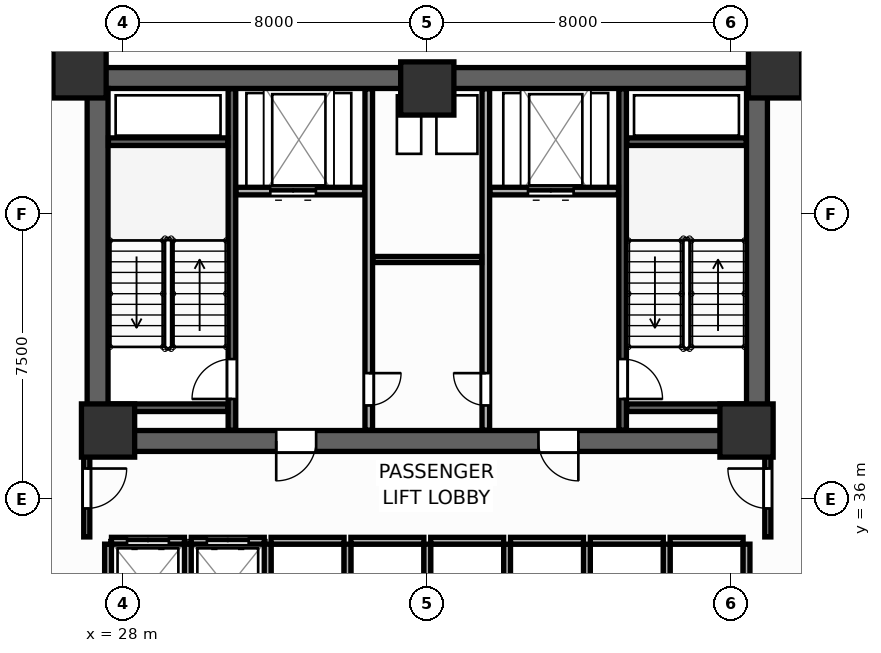
"""IFC4 building model, lengths in metres.
Left out: names, types, materials, properties, quantities, classifications, styles, units other than length and angle.
Written with IfcOpenShell. Run it as: python <this file> out.ifc"""

import sys

from ifc_helpers import new_model, si_unit, direction, frame, frame_2d, origin, origin_2d, place, context, subcontext, project, spatial, rectangle, extrude, source, transform, mapped, element, fill, save


model = new_model("IFC4")
c1 = context("Model", 3, precision=1e-05, world=origin(), true_north=direction((0.0, 1.0)))
c2 = subcontext(c1, "Body", "Model", "MODEL_VIEW")
j1 = project(units=[si_unit("LENGTHUNIT", "METRE"), si_unit("PLANEANGLEUNIT", "RADIAN")], contexts=[c1])
p1 = place(None, origin())
s1 = spatial("IfcSite", under=j1, at=p1, CompositionType="ELEMENT")
p2 = place(p1, origin())
s2 = spatial("IfcBuilding", under=s1, at=p2, CompositionType="ELEMENT")
p3 = place(p2, frame((0.0, 0.0, 71.7)))
s3 = spatial("IfcBuildingStorey", under=s2, at=p3, CompositionType="ELEMENT", Elevation=71.7)
p4 = place(p3, frame((27.05, 47.075, 0.0), z_axis=(0.0, 0.0, 1.0), x_axis=(1.0, 0.0, 0.0)))
e1 = element("IfcWall", 1, at=p4, inside=s3, PredefinedType="SHEAR", context=c2, shape_type="SweptSolid", body=[
    extrude(rectangle(XDim=17.9, YDim=0.55, at=frame_2d((8.95, 0.0))), origin(), (0.0, 0.0, 1.0), 3.9),
])
p5 = place(p3, frame((27.05, 37.525, 0.0), z_axis=(0.0, 0.0, 1.0), x_axis=(1.0, 0.0, 0.0)))
e2 = element("IfcWall", 2, at=p5, inside=s3, PredefinedType="SHEAR", context=c2, shape_type="SweptSolid", body=[
    extrude(rectangle(XDim=17.9, YDim=0.55, at=frame_2d((8.95, 0.0))), origin(), (0.0, 0.0, 1.0), 3.9),
])
p6 = place(p5, frame((4.975, 0.0, 0.0)))
e3 = element("IfcOpeningElement", 3, at=p6, cuts=e2, PredefinedType="OPENING", context=c2, shape_type="SweptSolid", body=[
    extrude(rectangle(XDim=1.05, YDim=2.1, at=frame_2d((0.525, 1.05))), frame((0.0, 0.285, 0.0), z_axis=(0.0, -1.0, 0.0), x_axis=(1.0, 0.0, 0.0)), (0.0, 0.0, 1.0), 0.57),
])
p7 = place(p5, frame((11.875, 0.0, 0.0)))
e4 = element("IfcOpeningElement", 4, at=p7, cuts=e2, PredefinedType="OPENING", context=c2, shape_type="SweptSolid", body=[
    extrude(rectangle(XDim=1.05, YDim=2.1, at=frame_2d((0.525, 1.05))), frame((0.0, 0.285, 0.0), z_axis=(0.0, -1.0, 0.0), x_axis=(1.0, 0.0, 0.0)), (0.0, 0.0, 1.0), 0.57),
])
for number, where, z_axis, x_axis in (
    (5, (27.325, 37.8, 0.0), (0.0, 0.0, 1.0), (0.0, 1.0, 0.0)),
    (6, (44.675, 37.8, 0.0), (0.0, 0.0, 1.0), (0.0, 1.0, 0.0)),
):
    element("IfcWall", number, at=place(p3, frame(where, z_axis=z_axis, x_axis=x_axis)), inside=s3, PredefinedType="SHEAR", context=c2, shape_type="SweptSolid", body=[
        extrude(rectangle(XDim=9.0, YDim=0.55, at=frame_2d((4.5, 0.0))), origin(), (0.0, 0.0, 1.0), 3.9),
    ])
m1 = source(origin(), c2, "Body", "SweptSolid", [
    extrude(rectangle(XDim=1.4, YDim=1.4, at=origin_2d()), origin(), (0.0, 0.0, 1.0), 3.9),
])
for number, where, z_axis, x_axis in (
    (7, (26.85, 47.25, 0.0), (0.0, 0.0, 1.0), (1.0, 0.0, 0.0)),
    (8, (45.15, 47.25, 0.0), (0.0, 0.0, 1.0), (1.0, 0.0, 0.0)),
    (9, (27.6, 37.8, 0.0), (0.0, 0.0, 1.0), (1.0, 0.0, 0.0)),
    (10, (44.4, 37.8, 0.0), (0.0, 0.0, 1.0), (1.0, 0.0, 0.0)),
    (11, (36.0, 46.8, 0.0), (0.0, 0.0, 1.0), (1.0, 0.0, 0.0)),
):
    element("IfcColumn", number, at=place(p3, frame(where, z_axis=z_axis, x_axis=x_axis)), inside=s3, PredefinedType="COLUMN", context=c2, shape_type="MappedRepresentation", body=[
        mapped(m1, transform((0.0, 0.0, 0.0), scale=1.0)),
    ])
p8 = place(p3, frame((30.86, 37.81, 0.0), z_axis=(0.0, 0.0, 1.0), x_axis=(0.0, 1.0, 0.0)))
e12 = element("IfcWall", 12, at=p8, inside=s3, PredefinedType="SHEAR", context=c2, shape_type="SweptSolid", body=[
    extrude(rectangle(XDim=8.98, YDim=0.2, at=frame_2d((4.49, 0.0))), origin(), (0.0, 0.0, 1.0), 3.9),
])
p9 = place(p8, frame((0.82, 0.0, 0.0)))
e13 = element("IfcOpeningElement", 13, at=p9, cuts=e12, PredefinedType="OPENING", context=c2, shape_type="SweptSolid", body=[
    extrude(rectangle(XDim=1.05, YDim=2.1, at=frame_2d((0.525, 1.05))), frame((0.0, 0.11, 0.0), z_axis=(0.0, -1.0, 0.0), x_axis=(1.0, 0.0, 0.0)), (0.0, 0.0, 1.0), 0.22),
])
for number, where, z_axis, x_axis in (
    (14, (27.61, 45.4, 0.0), (0.0, 0.0, 1.0), (1.0, 0.0, 0.0)),
    (15, (27.61, 38.4, 0.0), (0.0, 0.0, 1.0), (1.0, 0.0, 0.0)),
):
    element("IfcWall", number, at=place(p3, frame(where, z_axis=z_axis, x_axis=x_axis)), inside=s3, PredefinedType="SHEAR", context=c2, shape_type="SweptSolid", body=[
        extrude(rectangle(XDim=3.14, YDim=0.2, at=frame_2d((1.57, 0.0))), origin(), (0.0, 0.0, 1.0), 3.9),
    ])
p10 = place(p3, frame((41.14, 37.81, 0.0), z_axis=(0.0, 0.0, 1.0), x_axis=(0.0, 1.0, 0.0)))
e16 = element("IfcWall", 16, at=p10, inside=s3, PredefinedType="SHEAR", context=c2, shape_type="SweptSolid", body=[
    extrude(rectangle(XDim=8.98, YDim=0.2, at=frame_2d((4.49, 0.0))), origin(), (0.0, 0.0, 1.0), 3.9),
])
p11 = place(p10, frame((0.82, 0.0, 0.0)))
e17 = element("IfcOpeningElement", 17, at=p11, cuts=e16, PredefinedType="OPENING", context=c2, shape_type="SweptSolid", body=[
    extrude(rectangle(XDim=1.05, YDim=2.1, at=frame_2d((0.525, 1.05))), frame((0.0, 0.11, 0.0), z_axis=(0.0, -1.0, 0.0), x_axis=(1.0, 0.0, 0.0)), (0.0, 0.0, 1.0), 0.22),
])
for number, where, z_axis, x_axis in (
    (18, (41.25, 45.4, 0.0), (0.0, 0.0, 1.0), (1.0, 0.0, 0.0)),
    (19, (41.25, 38.4, 0.0), (0.0, 0.0, 1.0), (1.0, 0.0, 0.0)),
):
    element("IfcWall", number, at=place(p3, frame(where, z_axis=z_axis, x_axis=x_axis)), inside=s3, PredefinedType="SHEAR", context=c2, shape_type="SweptSolid", body=[
        extrude(rectangle(XDim=3.14, YDim=0.2, at=frame_2d((1.57, 0.0))), origin(), (0.0, 0.0, 1.0), 3.9),
    ])
p12 = place(p3, frame((30.97, 44.1, 0.0), z_axis=(0.0, 0.0, 1.0), x_axis=(1.0, 0.0, 0.0)))
e20 = element("IfcWall", 20, at=p12, inside=s3, PredefinedType="PARTITIONING", context=c2, shape_type="SweptSolid", body=[
    extrude(rectangle(XDim=3.38, YDim=0.2, at=frame_2d((1.69, 0.0))), origin(), (0.0, 0.0, 1.0), 3.68),
])
p13 = place(p12, frame((0.9, 0.0, 0.0)))
e21 = element("IfcOpeningElement", 21, at=p13, cuts=e20, PredefinedType="OPENING", context=c2, shape_type="SweptSolid", body=[
    extrude(rectangle(XDim=1.2, YDim=2.1, at=frame_2d((0.6, 1.05))), frame((0.0, 0.11, 0.0), z_axis=(0.0, -1.0, 0.0), x_axis=(1.0, 0.0, 0.0)), (0.0, 0.0, 1.0), 0.22),
])
p14 = place(p3, frame((37.65, 44.1, 0.0), z_axis=(0.0, 0.0, 1.0), x_axis=(1.0, 0.0, 0.0)))
e22 = element("IfcWall", 22, at=p14, inside=s3, PredefinedType="PARTITIONING", context=c2, shape_type="SweptSolid", body=[
    extrude(rectangle(XDim=3.38, YDim=0.2, at=frame_2d((1.69, 0.0))), origin(), (0.0, 0.0, 1.0), 3.68),
])
p15 = place(p14, frame((1.0, 0.0, 0.0)))
e23 = element("IfcOpeningElement", 23, at=p15, cuts=e22, PredefinedType="OPENING", context=c2, shape_type="SweptSolid", body=[
    extrude(rectangle(XDim=1.2, YDim=2.1, at=frame_2d((0.6, 1.05))), frame((0.0, 0.11, 0.0), z_axis=(0.0, -1.0, 0.0), x_axis=(1.0, 0.0, 0.0)), (0.0, 0.0, 1.0), 0.22),
])
p16 = place(p3, frame((34.46, 37.81, 0.0), z_axis=(0.0, 0.0, 1.0), x_axis=(0.0, 1.0, 0.0)))
e24 = element("IfcWall", 24, at=p16, inside=s3, PredefinedType="PARTITIONING", context=c2, shape_type="SweptSolid", body=[
    extrude(rectangle(XDim=8.98, YDim=0.2, at=frame_2d((4.49, 0.0))), origin(), (0.0, 0.0, 1.0), 3.68),
])
p17 = place(p16, frame((0.65, 0.0, 0.0)))
e25 = element("IfcOpeningElement", 25, at=p17, cuts=e24, PredefinedType="OPENING", context=c2, shape_type="SweptSolid", body=[
    extrude(rectangle(XDim=0.85, YDim=2.05, at=frame_2d((0.425, 1.025))), frame((0.0, 0.11, 0.0), z_axis=(0.0, -1.0, 0.0), x_axis=(1.0, 0.0, 0.0)), (0.0, 0.0, 1.0), 0.22),
])
p18 = place(p3, frame((37.54, 37.81, 0.0), z_axis=(0.0, 0.0, 1.0), x_axis=(0.0, 1.0, 0.0)))
e26 = element("IfcWall", 26, at=p18, inside=s3, PredefinedType="PARTITIONING", context=c2, shape_type="SweptSolid", body=[
    extrude(rectangle(XDim=8.98, YDim=0.2, at=frame_2d((4.49, 0.0))), origin(), (0.0, 0.0, 1.0), 3.68),
])
p19 = place(p18, frame((0.65, 0.0, 0.0)))
e27 = element("IfcOpeningElement", 27, at=p19, cuts=e26, PredefinedType="OPENING", context=c2, shape_type="SweptSolid", body=[
    extrude(rectangle(XDim=0.85, YDim=2.05, at=frame_2d((0.425, 1.025))), frame((0.0, 0.11, 0.0), z_axis=(0.0, -1.0, 0.0), x_axis=(1.0, 0.0, 0.0)), (0.0, 0.0, 1.0), 0.22),
])
p20 = place(p3, frame((34.57, 42.3, 0.0), z_axis=(0.0, 0.0, 1.0), x_axis=(1.0, 0.0, 0.0)))
e28 = element("IfcWall", 28, at=p20, inside=s3, PredefinedType="PARTITIONING", context=c2, shape_type="SweptSolid", body=[
    extrude(rectangle(XDim=2.86, YDim=0.16, at=frame_2d((1.43, 0.0))), origin(), (0.0, 0.0, 1.0), 3.68),
])
p21 = place(p3, frame((27.69, 34.9, 0.0), z_axis=(0.0, 0.0, 1.0), x_axis=(1.0, 0.0, 0.0)))
e29 = element("IfcWall", 29, at=p21, inside=s3, PredefinedType="PARTITIONING", context=c2, shape_type="SweptSolid", body=[
    extrude(rectangle(XDim=1.92, YDim=0.18, at=frame_2d((0.96, 0.0))), origin(), (0.0, 0.0, 1.0), 3.68),
])
p22 = place(p21, frame((0.41, 0.0, 0.0)))
e30 = element("IfcOpeningElement", 30, at=p22, cuts=e29, PredefinedType="OPENING", context=c2, shape_type="SweptSolid", body=[
    extrude(rectangle(XDim=1.1, YDim=2.1, at=frame_2d((0.55, 1.05))), frame((0.0, 0.1, 0.0), z_axis=(0.0, -1.0, 0.0), x_axis=(1.0, 0.0, 0.0)), (0.0, 0.0, 1.0), 0.2),
])
p23 = place(p3, frame((27.6, 32.49, 0.0), z_axis=(0.0, 0.0, 1.0), x_axis=(0.0, 1.0, 0.0)))
e31 = element("IfcWall", 31, at=p23, inside=s3, PredefinedType="PARTITIONING", context=c2, shape_type="SweptSolid", body=[
    extrude(rectangle(XDim=2.32, YDim=0.18, at=frame_2d((1.16, 0.0))), origin(), (0.0, 0.0, 1.0), 3.68),
])
p24 = place(p3, frame((29.79, 34.9, 0.0), z_axis=(0.0, 0.0, 1.0), x_axis=(1.0, 0.0, 0.0)))
e32 = element("IfcWall", 32, at=p24, inside=s3, PredefinedType="PARTITIONING", context=c2, shape_type="SweptSolid", body=[
    extrude(rectangle(XDim=1.92, YDim=0.18, at=frame_2d((0.96, 0.0))), origin(), (0.0, 0.0, 1.0), 3.68),
])
p25 = place(p24, frame((0.41, 0.0, 0.0)))
e33 = element("IfcOpeningElement", 33, at=p25, cuts=e32, PredefinedType="OPENING", context=c2, shape_type="SweptSolid", body=[
    extrude(rectangle(XDim=1.1, YDim=2.1, at=frame_2d((0.55, 1.05))), frame((0.0, 0.1, 0.0), z_axis=(0.0, -1.0, 0.0), x_axis=(1.0, 0.0, 0.0)), (0.0, 0.0, 1.0), 0.2),
])
p26 = place(p3, frame((29.7, 32.49, 0.0), z_axis=(0.0, 0.0, 1.0), x_axis=(0.0, 1.0, 0.0)))
e34 = element("IfcWall", 34, at=p26, inside=s3, PredefinedType="PARTITIONING", context=c2, shape_type="SweptSolid", body=[
    extrude(rectangle(XDim=2.32, YDim=0.18, at=frame_2d((1.16, 0.0))), origin(), (0.0, 0.0, 1.0), 3.68),
])
p27 = place(p3, frame((31.89, 34.9, 0.0), z_axis=(0.0, 0.0, 1.0), x_axis=(1.0, 0.0, 0.0)))
e35 = element("IfcWall", 35, at=p27, inside=s3, PredefinedType="PARTITIONING", context=c2, shape_type="SweptSolid", body=[
    extrude(rectangle(XDim=1.92, YDim=0.18, at=frame_2d((0.96, 0.0))), origin(), (0.0, 0.0, 1.0), 3.68),
])
p28 = place(p3, frame((31.8, 32.49, 0.0), z_axis=(0.0, 0.0, 1.0), x_axis=(0.0, 1.0, 0.0)))
e36 = element("IfcWall", 36, at=p28, inside=s3, PredefinedType="PARTITIONING", context=c2, shape_type="SweptSolid", body=[
    extrude(rectangle(XDim=2.32, YDim=0.18, at=frame_2d((1.16, 0.0))), origin(), (0.0, 0.0, 1.0), 3.68),
])
p29 = place(p3, frame((33.99, 34.9, 0.0), z_axis=(0.0, 0.0, 1.0), x_axis=(1.0, 0.0, 0.0)))
e37 = element("IfcWall", 37, at=p29, inside=s3, PredefinedType="PARTITIONING", context=c2, shape_type="SweptSolid", body=[
    extrude(rectangle(XDim=1.92, YDim=0.18, at=frame_2d((0.96, 0.0))), origin(), (0.0, 0.0, 1.0), 3.68),
])
p30 = place(p3, frame((33.9, 32.49, 0.0), z_axis=(0.0, 0.0, 1.0), x_axis=(0.0, 1.0, 0.0)))
e38 = element("IfcWall", 38, at=p30, inside=s3, PredefinedType="PARTITIONING", context=c2, shape_type="SweptSolid", body=[
    extrude(rectangle(XDim=2.32, YDim=0.18, at=frame_2d((1.16, 0.0))), origin(), (0.0, 0.0, 1.0), 3.68),
])
p31 = place(p3, frame((36.09, 34.9, 0.0), z_axis=(0.0, 0.0, 1.0), x_axis=(1.0, 0.0, 0.0)))
e39 = element("IfcWall", 39, at=p31, inside=s3, PredefinedType="PARTITIONING", context=c2, shape_type="SweptSolid", body=[
    extrude(rectangle(XDim=1.92, YDim=0.18, at=frame_2d((0.96, 0.0))), origin(), (0.0, 0.0, 1.0), 3.68),
])
p32 = place(p3, frame((36.0, 32.49, 0.0), z_axis=(0.0, 0.0, 1.0), x_axis=(0.0, 1.0, 0.0)))
e40 = element("IfcWall", 40, at=p32, inside=s3, PredefinedType="PARTITIONING", context=c2, shape_type="SweptSolid", body=[
    extrude(rectangle(XDim=2.32, YDim=0.18, at=frame_2d((1.16, 0.0))), origin(), (0.0, 0.0, 1.0), 3.68),
])
p33 = place(p3, frame((38.19, 34.9, 0.0), z_axis=(0.0, 0.0, 1.0), x_axis=(1.0, 0.0, 0.0)))
e41 = element("IfcWall", 41, at=p33, inside=s3, PredefinedType="PARTITIONING", context=c2, shape_type="SweptSolid", body=[
    extrude(rectangle(XDim=1.92, YDim=0.18, at=frame_2d((0.96, 0.0))), origin(), (0.0, 0.0, 1.0), 3.68),
])
p34 = place(p3, frame((38.1, 32.49, 0.0), z_axis=(0.0, 0.0, 1.0), x_axis=(0.0, 1.0, 0.0)))
e42 = element("IfcWall", 42, at=p34, inside=s3, PredefinedType="PARTITIONING", context=c2, shape_type="SweptSolid", body=[
    extrude(rectangle(XDim=2.32, YDim=0.18, at=frame_2d((1.16, 0.0))), origin(), (0.0, 0.0, 1.0), 3.68),
])
p35 = place(p3, frame((40.29, 34.9, 0.0), z_axis=(0.0, 0.0, 1.0), x_axis=(1.0, 0.0, 0.0)))
e43 = element("IfcWall", 43, at=p35, inside=s3, PredefinedType="PARTITIONING", context=c2, shape_type="SweptSolid", body=[
    extrude(rectangle(XDim=1.92, YDim=0.18, at=frame_2d((0.96, 0.0))), origin(), (0.0, 0.0, 1.0), 3.68),
])
p36 = place(p3, frame((40.2, 32.49, 0.0), z_axis=(0.0, 0.0, 1.0), x_axis=(0.0, 1.0, 0.0)))
e44 = element("IfcWall", 44, at=p36, inside=s3, PredefinedType="PARTITIONING", context=c2, shape_type="SweptSolid", body=[
    extrude(rectangle(XDim=2.32, YDim=0.18, at=frame_2d((1.16, 0.0))), origin(), (0.0, 0.0, 1.0), 3.68),
])
p37 = place(p3, frame((42.39, 34.9, 0.0), z_axis=(0.0, 0.0, 1.0), x_axis=(1.0, 0.0, 0.0)))
e45 = element("IfcWall", 45, at=p37, inside=s3, PredefinedType="PARTITIONING", context=c2, shape_type="SweptSolid", body=[
    extrude(rectangle(XDim=1.92, YDim=0.18, at=frame_2d((0.96, 0.0))), origin(), (0.0, 0.0, 1.0), 3.68),
])
for number, where, z_axis, x_axis in (
    (46, (42.3, 32.49, 0.0), (0.0, 0.0, 1.0), (0.0, 1.0, 0.0)),
    (47, (44.4, 32.49, 0.0), (0.0, 0.0, 1.0), (0.0, 1.0, 0.0)),
):
    element("IfcWall", number, at=place(p3, frame(where, z_axis=z_axis, x_axis=x_axis)), inside=s3, PredefinedType="PARTITIONING", context=c2, shape_type="SweptSolid", body=[
        extrude(rectangle(XDim=2.32, YDim=0.18, at=frame_2d((1.16, 0.0))), origin(), (0.0, 0.0, 1.0), 3.68),
    ])
p38 = place(p3, frame((27.04, 35.0, 0.0), z_axis=(0.0, 0.0, 1.0), x_axis=(0.0, 1.0, 0.0)))
e48 = element("IfcWall", 48, at=p38, inside=s3, PredefinedType="PARTITIONING", context=c2, shape_type="SweptSolid", body=[
    extrude(rectangle(XDim=2.65, YDim=0.16, at=frame_2d((1.325, 0.0))), origin(), (0.0, 0.0, 1.0), 3.68),
])
p39 = place(p38, frame((0.75, 0.0, 0.0)))
e49 = element("IfcOpeningElement", 49, at=p39, cuts=e48, PredefinedType="OPENING", context=c2, shape_type="SweptSolid", body=[
    extrude(rectangle(XDim=1.05, YDim=2.1, at=frame_2d((0.525, 1.05))), frame((0.0, 0.09, 0.0), z_axis=(0.0, -1.0, 0.0), x_axis=(1.0, 0.0, 0.0)), (0.0, 0.0, 1.0), 0.18),
])
p40 = place(p3, frame((44.96, 35.0, 0.0), z_axis=(0.0, 0.0, 1.0), x_axis=(0.0, 1.0, 0.0)))
e50 = element("IfcWall", 50, at=p40, inside=s3, PredefinedType="PARTITIONING", context=c2, shape_type="SweptSolid", body=[
    extrude(rectangle(XDim=2.65, YDim=0.16, at=frame_2d((1.325, 0.0))), origin(), (0.0, 0.0, 1.0), 3.68),
])
p41 = place(p40, frame((0.75, 0.0, 0.0)))
e51 = element("IfcOpeningElement", 51, at=p41, cuts=e50, PredefinedType="OPENING", context=c2, shape_type="SweptSolid", body=[
    extrude(rectangle(XDim=1.05, YDim=2.1, at=frame_2d((0.525, 1.05))), frame((0.0, 0.09, 0.0), z_axis=(0.0, -1.0, 0.0), x_axis=(1.0, 0.0, 0.0)), (0.0, 0.0, 1.0), 0.18),
])
p42 = place(p3, frame((44.965, 47.34, 0.0), z_axis=(0.0, 0.0, 1.0), x_axis=(0.0, 1.0, 0.0)))
e52 = element("IfcWall", 52, at=p42, inside=s3, PredefinedType="PARTITIONING", context=c2, shape_type="SweptSolid", body=[
    extrude(rectangle(XDim=9.017, YDim=0.16, at=frame_2d((4.508, 0.0))), origin(), (0.0, 0.0, 1.0), 2.24),
])
p43 = place(p42, frame((3.927, 0.0, 0.0)))
e53 = element("IfcOpeningElement", 53, at=p43, cuts=e52, PredefinedType="OPENING", context=c2, shape_type="SweptSolid", body=[
    extrude(rectangle(XDim=0.95, YDim=2.05, at=frame_2d((0.475, 1.025))), frame((0.0, 0.09, 0.0), z_axis=(0.0, -1.0, 0.0), x_axis=(1.0, 0.0, 0.0)), (0.0, 0.0, 1.0), 0.18),
])
p44 = place(p3, frame((27.035, 47.34, 0.0), z_axis=(0.0, 0.0, 1.0), x_axis=(0.0, 1.0, 0.0)))
e54 = element("IfcWall", 54, at=p44, inside=s3, PredefinedType="PARTITIONING", context=c2, shape_type="SweptSolid", body=[
    extrude(rectangle(XDim=8.094, YDim=0.16, at=frame_2d((4.047, 0.0))), origin(), (0.0, 0.0, 1.0), 3.68),
])
p45 = place(p9, origin())
e55 = element("IfcDoor", 55, at=p45, inside=s3, OperationType="SINGLE_SWING_LEFT", PredefinedType="DOOR", context=c2, shape_type="SweptSolid", body=[
    extrude(rectangle(XDim=1.05, YDim=2.1, at=frame_2d((0.525, 1.05))), frame((0.0, 0.025, 0.0), z_axis=(0.0, -1.0, 0.0), x_axis=(1.0, 0.0, 0.0)), (0.0, 0.0, 1.0), 0.05),
])
fill(e13, e55)
p46 = place(p11, frame((1.05, 0.0, 0.0), z_axis=(0.0, 0.0, 1.0), x_axis=(-1.0, 0.0, 0.0)))
e56 = element("IfcDoor", 56, at=p46, inside=s3, OperationType="SINGLE_SWING_RIGHT", PredefinedType="DOOR", context=c2, shape_type="SweptSolid", body=[
    extrude(rectangle(XDim=1.05, YDim=2.1, at=frame_2d((0.525, 1.05))), frame((0.0, 0.025, 0.0), z_axis=(0.0, -1.0, 0.0), x_axis=(1.0, 0.0, 0.0)), (0.0, 0.0, 1.0), 0.05),
])
fill(e17, e56)
p47 = place(p13, origin())
e57 = element("IfcDoor", 57, at=p47, inside=s3, OperationType="DOUBLE_DOOR_SLIDING", PredefinedType="DOOR", context=c2, shape_type="SweptSolid", body=[
    extrude(rectangle(XDim=1.2, YDim=2.1, at=frame_2d((0.6, 1.05))), frame((0.0, 0.025, 0.0), z_axis=(0.0, -1.0, 0.0), x_axis=(1.0, 0.0, 0.0)), (0.0, 0.0, 1.0), 0.05),
])
fill(e21, e57)
p48 = place(p15, origin())
e58 = element("IfcDoor", 58, at=p48, inside=s3, OperationType="DOUBLE_DOOR_SLIDING", PredefinedType="DOOR", context=c2, shape_type="SweptSolid", body=[
    extrude(rectangle(XDim=1.2, YDim=2.1, at=frame_2d((0.6, 1.05))), frame((0.0, 0.025, 0.0), z_axis=(0.0, -1.0, 0.0), x_axis=(1.0, 0.0, 0.0)), (0.0, 0.0, 1.0), 0.05),
])
fill(e23, e58)
p49 = place(p17, frame((0.85, 0.0, 0.0), z_axis=(0.0, 0.0, 1.0), x_axis=(-1.0, 0.0, 0.0)))
e59 = element("IfcDoor", 59, at=p49, inside=s3, OperationType="SINGLE_SWING_LEFT", PredefinedType="DOOR", context=c2, shape_type="SweptSolid", body=[
    extrude(rectangle(XDim=0.85, YDim=2.05, at=frame_2d((0.425, 1.025))), frame((0.0, 0.025, 0.0), z_axis=(0.0, -1.0, 0.0), x_axis=(1.0, 0.0, 0.0)), (0.0, 0.0, 1.0), 0.05),
])
fill(e25, e59)
p50 = place(p19, origin())
e60 = element("IfcDoor", 60, at=p50, inside=s3, OperationType="SINGLE_SWING_RIGHT", PredefinedType="DOOR", context=c2, shape_type="SweptSolid", body=[
    extrude(rectangle(XDim=0.85, YDim=2.05, at=frame_2d((0.425, 1.025))), frame((0.0, 0.025, 0.0), z_axis=(0.0, -1.0, 0.0), x_axis=(1.0, 0.0, 0.0)), (0.0, 0.0, 1.0), 0.05),
])
fill(e27, e60)
p51 = place(p22, origin())
e61 = element("IfcDoor", 61, at=p51, inside=s3, OperationType="DOUBLE_DOOR_SLIDING", PredefinedType="DOOR", context=c2, shape_type="SweptSolid", body=[
    extrude(rectangle(XDim=1.1, YDim=2.1, at=frame_2d((0.55, 1.05))), frame((0.0, 0.025, 0.0), z_axis=(0.0, -1.0, 0.0), x_axis=(1.0, 0.0, 0.0)), (0.0, 0.0, 1.0), 0.05),
])
fill(e30, e61)
p52 = place(p25, origin())
e62 = element("IfcDoor", 62, at=p52, inside=s3, OperationType="DOUBLE_DOOR_SLIDING", PredefinedType="DOOR", context=c2, shape_type="SweptSolid", body=[
    extrude(rectangle(XDim=1.1, YDim=2.1, at=frame_2d((0.55, 1.05))), frame((0.0, 0.025, 0.0), z_axis=(0.0, -1.0, 0.0), x_axis=(1.0, 0.0, 0.0)), (0.0, 0.0, 1.0), 0.05),
])
fill(e33, e62)
p53 = place(p39, frame((1.05, 0.0, 0.0), z_axis=(0.0, 0.0, 1.0), x_axis=(-1.0, 0.0, 0.0)))
e63 = element("IfcDoor", 63, at=p53, inside=s3, OperationType="SINGLE_SWING_LEFT", PredefinedType="DOOR", context=c2, shape_type="SweptSolid", body=[
    extrude(rectangle(XDim=1.05, YDim=2.1, at=frame_2d((0.525, 1.05))), frame((0.0, 0.025, 0.0), z_axis=(0.0, -1.0, 0.0), x_axis=(1.0, 0.0, 0.0)), (0.0, 0.0, 1.0), 0.05),
])
fill(e49, e63)
p54 = place(p41, origin())
e64 = element("IfcDoor", 64, at=p54, inside=s3, OperationType="SINGLE_SWING_RIGHT", PredefinedType="DOOR", context=c2, shape_type="SweptSolid", body=[
    extrude(rectangle(XDim=1.05, YDim=2.1, at=frame_2d((0.525, 1.05))), frame((0.0, 0.025, 0.0), z_axis=(0.0, -1.0, 0.0), x_axis=(1.0, 0.0, 0.0)), (0.0, 0.0, 1.0), 0.05),
])
fill(e51, e64)
p55 = place(p6, frame((1.05, 0.0, 0.0), z_axis=(0.0, 0.0, 1.0), x_axis=(-1.0, 0.0, 0.0)))
e65 = element("IfcDoor", 65, at=p55, inside=s3, OperationType="SINGLE_SWING_RIGHT", PredefinedType="DOOR", context=c2, shape_type="SweptSolid", body=[
    extrude(rectangle(XDim=1.05, YDim=2.1, at=frame_2d((0.525, 1.05))), frame((0.0, 0.025, 0.0), z_axis=(0.0, -1.0, 0.0), x_axis=(1.0, 0.0, 0.0)), (0.0, 0.0, 1.0), 0.05),
])
fill(e3, e65)
p56 = place(p7, frame((1.05, 0.0, 0.0), z_axis=(0.0, 0.0, 1.0), x_axis=(-1.0, 0.0, 0.0)))
e66 = element("IfcDoor", 66, at=p56, inside=s3, OperationType="SINGLE_SWING_LEFT", PredefinedType="DOOR", context=c2, shape_type="SweptSolid", body=[
    extrude(rectangle(XDim=1.05, YDim=2.1, at=frame_2d((0.525, 1.05))), frame((0.0, 0.025, 0.0), z_axis=(0.0, -1.0, 0.0), x_axis=(1.0, 0.0, 0.0)), (0.0, 0.0, 1.0), 0.05),
])
fill(e4, e66)
save(model, sys.argv[1])
